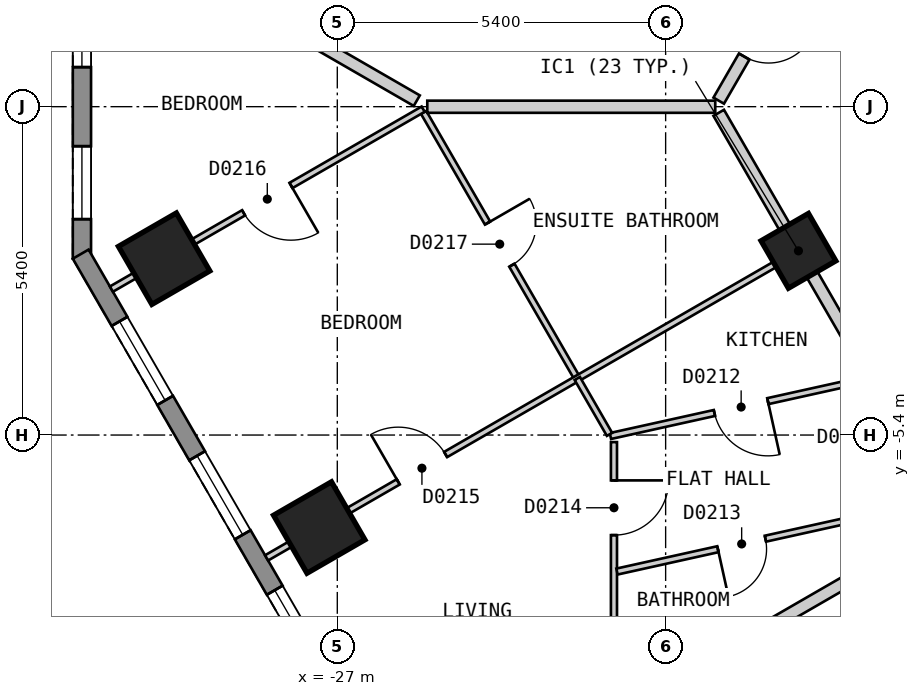
"""IFC4 building model, lengths in metres.
Left out: names, types, materials, properties, quantities, classifications, styles, units other than length and angle.
Written with IfcOpenShell. Run it as: python <this file> out.ifc"""

import sys

from ifc_helpers import new_model, si_unit, direction, frame, frame_2d, origin, origin_2d, place, context, subcontext, project, spatial, polyline, rectangle, outline, extrude, element, fill, save


model = new_model("IFC4")
c1 = context("Model", 3, precision=1e-05, world=origin(), true_north=direction((0.0, 1.0)))
c2 = subcontext(c1, "Body", "Model", "MODEL_VIEW")
j1 = project(units=[si_unit("LENGTHUNIT", "METRE"), si_unit("PLANEANGLEUNIT", "RADIAN")], contexts=[c1])
p1 = place(None, origin())
s1 = spatial("IfcSite", under=j1, at=p1, CompositionType="ELEMENT")
p2 = place(p1, origin())
s2 = spatial("IfcBuilding", under=s1, at=p2, CompositionType="ELEMENT")
p3 = place(p2, frame((0.0, 0.0, 47.4)))
s3 = spatial("IfcBuildingStorey", under=s2, at=p3, CompositionType="ELEMENT", Elevation=47.4)
for number, where, z_axis, x_axis in (
    (1, (-29.848, -2.5, 0.0), (0.0, 0.0, 1.0), (0.5, -0.866, 0.0)),
    (2, (-27.297, -6.921, 0.0), (0.0, 0.0, 1.0), (0.5, -0.866, 0.0)),
):
    element("IfcColumn", number, at=place(p3, frame(where, z_axis=z_axis, x_axis=x_axis)), inside=s3, PredefinedType="COLUMN", context=c2, shape_type="SweptSolid", body=[
        extrude(rectangle(XDim=1.1, YDim=1.1, at=origin_2d()), origin(), (0.0, 0.0, 1.0), 3.0),
    ])
p4 = place(p3, frame((-19.416, -2.371, 0.0), z_axis=(0.0, 0.0, 1.0), x_axis=(0.499984884929, -0.866034130299, 0.0)))
e3 = element("IfcColumn", 3, at=p4, inside=s3, PredefinedType="COLUMN", context=c2, shape_type="SweptSolid", body=[
    extrude(rectangle(XDim=0.9, YDim=0.9, at=origin_2d()), origin(), (0.0, 0.0, 1.0), 3.0),
])
p5 = place(p3, frame((-31.2, 2.5, 0.0), z_axis=(0.0, 0.0, 1.0), x_axis=(0.0, -1.0, 0.0)))
e4 = element("IfcWall", 4, at=p5, inside=s3, PredefinedType="SOLIDWALL", context=c2, shape_type="SweptSolid", body=[
    extrude(outline(polyline([(0.0, -0.15), (5.0, -0.15), (4.92, 0.15), (0.08, 0.15), (0.0, -0.15)])), origin(), (0.0, 0.0, 1.0), 2.7),
])
p6 = place(p5, frame((0.65, 0.0, 0.15)))
e5 = element("IfcOpeningElement", 5, at=p6, cuts=e4, PredefinedType="OPENING", context=c2, shape_type="SweptSolid", body=[
    extrude(rectangle(XDim=1.2, YDim=2.1, at=frame_2d((0.6, 1.05))), frame((0.0, 0.16, 0.0), z_axis=(0.0, -1.0, 0.0), x_axis=(1.0, 0.0, 0.0)), (0.0, 0.0, 1.0), 0.32),
])
p7 = place(p5, frame((3.15, 0.0, 0.15)))
e6 = element("IfcOpeningElement", 6, at=p7, cuts=e4, PredefinedType="OPENING", context=c2, shape_type="SweptSolid", body=[
    extrude(rectangle(XDim=1.2, YDim=2.1, at=frame_2d((0.6, 1.05))), frame((0.0, 0.16, 0.0), z_axis=(0.0, -1.0, 0.0), x_axis=(1.0, 0.0, 0.0)), (0.0, 0.0, 1.0), 0.32),
])
p8 = place(p3, frame((-31.22, -2.425, 0.0), z_axis=(0.0, 0.0, 1.0), x_axis=(0.500001938803, -0.866024284413, 0.0)))
e7 = element("IfcWall", 7, at=p8, inside=s3, PredefinedType="SOLIDWALL", context=c2, shape_type="SweptSolid", body=[
    extrude(outline(polyline([(0.0, -0.15), (27.02, -0.15), (26.94, 0.15), (0.08, 0.15), (0.0, -0.15)])), origin(), (0.0, 0.0, 1.0), 2.7),
])
p9 = place(p8, frame((1.277, 0.0, 0.15)))
e8 = element("IfcOpeningElement", 8, at=p9, cuts=e7, PredefinedType="OPENING", context=c2, shape_type="SweptSolid", body=[
    extrude(rectangle(XDim=1.5, YDim=2.1, at=frame_2d((0.75, 1.05))), frame((0.0, 0.16, 0.0), z_axis=(0.0, -1.0, 0.0), x_axis=(1.0, 0.0, 0.0)), (0.0, 0.0, 1.0), 0.32),
])
p10 = place(p8, frame((3.829, 0.0, 0.15)))
e9 = element("IfcOpeningElement", 9, at=p10, cuts=e7, PredefinedType="OPENING", context=c2, shape_type="SweptSolid", body=[
    extrude(rectangle(XDim=1.5, YDim=2.1, at=frame_2d((0.75, 1.05))), frame((0.0, 0.16, 0.0), z_axis=(0.0, -1.0, 0.0), x_axis=(1.0, 0.0, 0.0)), (0.0, 0.0, 1.0), 0.32),
])
p11 = place(p8, frame((6.382, 0.0, 0.15)))
e10 = element("IfcOpeningElement", 10, at=p11, cuts=e7, PredefinedType="OPENING", context=c2, shape_type="SweptSolid", body=[
    extrude(rectangle(XDim=1.5, YDim=2.1, at=frame_2d((0.75, 1.05))), frame((0.0, 0.16, 0.0), z_axis=(0.0, -1.0, 0.0), x_axis=(1.0, 0.0, 0.0)), (0.0, 0.0, 1.0), 0.32),
])
p12 = place(p8, frame((8.933, 0.0, 0.15)))
e11 = element("IfcOpeningElement", 11, at=p12, cuts=e7, PredefinedType="OPENING", context=c2, shape_type="SweptSolid", body=[
    extrude(rectangle(XDim=1.5, YDim=2.1, at=frame_2d((0.75, 1.05))), frame((0.0, 0.16, 0.0), z_axis=(0.0, -1.0, 0.0), x_axis=(1.0, 0.0, 0.0)), (0.0, 0.0, 1.0), 0.32),
])
p13 = place(p8, frame((11.485, 0.0, 0.15)))
e12 = element("IfcOpeningElement", 12, at=p13, cuts=e7, PredefinedType="OPENING", context=c2, shape_type="SweptSolid", body=[
    extrude(rectangle(XDim=1.5, YDim=2.1, at=frame_2d((0.75, 1.05))), frame((0.0, 0.16, 0.0), z_axis=(0.0, -1.0, 0.0), x_axis=(1.0, 0.0, 0.0)), (0.0, 0.0, 1.0), 0.32),
])
p14 = place(p8, frame((14.037, 0.0, 0.15)))
e13 = element("IfcOpeningElement", 13, at=p14, cuts=e7, PredefinedType="OPENING", context=c2, shape_type="SweptSolid", body=[
    extrude(rectangle(XDim=1.5, YDim=2.1, at=frame_2d((0.75, 1.05))), frame((0.0, 0.16, 0.0), z_axis=(0.0, -1.0, 0.0), x_axis=(1.0, 0.0, 0.0)), (0.0, 0.0, 1.0), 0.32),
])
p15 = place(p8, frame((16.589, 0.0, 0.15)))
e14 = element("IfcOpeningElement", 14, at=p15, cuts=e7, PredefinedType="OPENING", context=c2, shape_type="SweptSolid", body=[
    extrude(rectangle(XDim=1.5, YDim=2.1, at=frame_2d((0.75, 1.05))), frame((0.0, 0.16, 0.0), z_axis=(0.0, -1.0, 0.0), x_axis=(1.0, 0.0, 0.0)), (0.0, 0.0, 1.0), 0.32),
])
p16 = place(p8, frame((19.141, 0.0, 0.15)))
e15 = element("IfcOpeningElement", 15, at=p16, cuts=e7, PredefinedType="OPENING", context=c2, shape_type="SweptSolid", body=[
    extrude(rectangle(XDim=1.5, YDim=2.1, at=frame_2d((0.75, 1.05))), frame((0.0, 0.16, 0.0), z_axis=(0.0, -1.0, 0.0), x_axis=(1.0, 0.0, 0.0)), (0.0, 0.0, 1.0), 0.32),
])
p17 = place(p8, frame((21.693, 0.0, 0.15)))
e16 = element("IfcOpeningElement", 16, at=p17, cuts=e7, PredefinedType="OPENING", context=c2, shape_type="SweptSolid", body=[
    extrude(rectangle(XDim=1.5, YDim=2.1, at=frame_2d((0.75, 1.05))), frame((0.0, 0.16, 0.0), z_axis=(0.0, -1.0, 0.0), x_axis=(1.0, 0.0, 0.0)), (0.0, 0.0, 1.0), 0.32),
])
p18 = place(p8, frame((24.244, 0.0, 0.15)))
e17 = element("IfcOpeningElement", 17, at=p18, cuts=e7, PredefinedType="OPENING", context=c2, shape_type="SweptSolid", body=[
    extrude(rectangle(XDim=1.5, YDim=2.1, at=frame_2d((0.75, 1.05))), frame((0.0, 0.16, 0.0), z_axis=(0.0, -1.0, 0.0), x_axis=(1.0, 0.0, 0.0)), (0.0, 0.0, 1.0), 0.32),
])
p19 = place(p3, frame((-20.727, -0.101, 0.0), z_axis=(0.0, 0.0, 1.0), x_axis=(0.500070814966, -0.865984514884, 0.0)))
e18 = element("IfcWall", 18, at=p19, inside=s3, PredefinedType="PARTITIONING", context=c2, shape_type="SweptSolid", body=[
    extrude(rectangle(XDim=7.239, YDim=0.2, at=frame_2d((3.62, 0.0))), origin(), (0.0, 0.0, 1.0), 2.7),
])
p20 = place(p19, frame((5.681, 0.0, 0.0)))
e19 = element("IfcOpeningElement", 19, at=p20, cuts=e18, PredefinedType="OPENING", context=c2, shape_type="SweptSolid", body=[
    extrude(rectangle(XDim=1.0, YDim=2.1, at=frame_2d((0.5, 1.05))), frame((0.0, 0.11, 0.0), z_axis=(0.0, -1.0, 0.0), x_axis=(1.0, 0.0, 0.0)), (0.0, 0.0, 1.0), 0.22),
])
p21 = place(p3, frame((-20.727, 0.099, 0.0), z_axis=(0.0, 0.0, 1.0), x_axis=(0.499993204491, 0.866029327138, 0.0)))
e20 = element("IfcWall", 20, at=p21, inside=s3, PredefinedType="PARTITIONING", context=c2, shape_type="SweptSolid", body=[
    extrude(rectangle(XDim=20.554, YDim=0.2, at=frame_2d((10.277, 0.0))), origin(), (0.0, 0.0, 1.0), 2.7),
])
p22 = place(p21, frame((14.88, 0.0, 0.0)))
e21 = element("IfcOpeningElement", 21, at=p22, cuts=e20, PredefinedType="OPENING", context=c2, shape_type="SweptSolid", body=[
    extrude(rectangle(XDim=1.0, YDim=2.1, at=frame_2d((0.5, 1.05))), frame((0.0, 0.11, 0.0), z_axis=(0.0, -1.0, 0.0), x_axis=(1.0, 0.0, 0.0)), (0.0, 0.0, 1.0), 0.22),
])
p23 = place(p21, frame((4.673, 0.0, 0.0)))
e22 = element("IfcOpeningElement", 22, at=p23, cuts=e20, PredefinedType="OPENING", context=c2, shape_type="SweptSolid", body=[
    extrude(rectangle(XDim=1.0, YDim=2.1, at=frame_2d((0.5, 1.05))), frame((0.0, 0.11, 0.0), z_axis=(0.0, -1.0, 0.0), x_axis=(1.0, 0.0, 0.0)), (0.0, 0.0, 1.0), 0.22),
])
p24 = place(p21, frame((0.838, 0.0, 0.0)))
e23 = element("IfcOpeningElement", 23, at=p24, cuts=e20, PredefinedType="OPENING", context=c2, shape_type="SweptSolid", body=[
    extrude(rectangle(XDim=0.8, YDim=2.1, at=frame_2d((0.4, 1.05))), frame((0.0, 0.11, 0.0), z_axis=(0.0, -1.0, 0.0), x_axis=(1.0, 0.0, 0.0)), (0.0, 0.0, 1.0), 0.22),
])
p25 = place(p3, frame((-25.58, -0.094, 0.0), z_axis=(0.0, 0.0, 1.0), x_axis=(0.500093258202, -0.865971554441, 0.0)))
e24 = element("IfcWall", 24, at=p25, inside=s3, PredefinedType="PARTITIONING", context=c2, shape_type="SweptSolid", body=[
    extrude(rectangle(XDim=5.053, YDim=0.1, at=frame_2d((2.527, 0.0))), origin(), (0.0, 0.0, 1.0), 2.7),
])
p26 = place(p25, frame((2.102, 0.0, 0.0)))
e25 = element("IfcOpeningElement", 25, at=p26, cuts=e24, PredefinedType="OPENING", context=c2, shape_type="SweptSolid", body=[
    extrude(rectangle(XDim=0.8, YDim=2.1, at=frame_2d((0.4, 1.05))), frame((0.0, 0.06, 0.0), z_axis=(0.0, -1.0, 0.0), x_axis=(1.0, 0.0, 0.0)), (0.0, 0.0, 1.0), 0.12),
])
p27 = place(p3, frame((-22.45, -9.901, 0.0), z_axis=(0.0, 0.0, 1.0), x_axis=(0.0, 1.0, 0.0)))
e26 = element("IfcWall", 26, at=p27, inside=s3, PredefinedType="PARTITIONING", context=c2, shape_type="SweptSolid", body=[
    extrude(rectangle(XDim=4.385, YDim=0.1, at=frame_2d((2.192, 0.0))), origin(), (0.0, 0.0, 1.0), 2.7),
])
p28 = place(p27, frame((2.855, 0.0, 0.0)))
e27 = element("IfcOpeningElement", 27, at=p28, cuts=e26, PredefinedType="OPENING", context=c2, shape_type="SweptSolid", body=[
    extrude(rectangle(XDim=0.9, YDim=2.1, at=frame_2d((0.45, 1.05))), frame((0.0, 0.06, 0.0), z_axis=(0.0, -1.0, 0.0), x_axis=(1.0, 0.0, 0.0)), (0.0, 0.0, 1.0), 0.12),
])
p29 = place(p3, frame((-22.508, -5.416, 0.0), z_axis=(0.0, 0.0, 1.0), x_axis=(0.976332464286, 0.216275100696, 0.0)))
e28 = element("IfcWall", 28, at=p29, inside=s3, PredefinedType="PARTITIONING", context=c2, shape_type="SweptSolid", body=[
    extrude(rectangle(XDim=4.3, YDim=0.1, at=frame_2d((2.15, 0.0))), origin(), (0.0, 0.0, 1.0), 2.7),
])
p30 = place(p29, frame((1.752, 0.0, 0.0)))
e29 = element("IfcOpeningElement", 29, at=p30, cuts=e28, PredefinedType="OPENING", context=c2, shape_type="SweptSolid", body=[
    extrude(rectangle(XDim=0.9, YDim=2.1, at=frame_2d((0.45, 1.05))), frame((0.0, 0.06, 0.0), z_axis=(0.0, -1.0, 0.0), x_axis=(1.0, 0.0, 0.0)), (0.0, 0.0, 1.0), 0.12),
])
p31 = place(p3, frame((-22.4, -7.645, 0.0), z_axis=(0.0, 0.0, 1.0), x_axis=(0.97634896822, 0.216200583385, 0.0)))
e30 = element("IfcWall", 30, at=p31, inside=s3, PredefinedType="PARTITIONING", context=c2, shape_type="SweptSolid", body=[
    extrude(rectangle(XDim=4.25, YDim=0.1, at=frame_2d((2.125, 0.0))), origin(), (0.0, 0.0, 1.0), 2.7),
])
p32 = place(p31, frame((1.7, 0.0, 0.0)))
e31 = element("IfcOpeningElement", 31, at=p32, cuts=e30, PredefinedType="OPENING", context=c2, shape_type="SweptSolid", body=[
    extrude(rectangle(XDim=0.8, YDim=2.1, at=frame_2d((0.4, 1.05))), frame((0.0, 0.06, 0.0), z_axis=(0.0, -1.0, 0.0), x_axis=(1.0, 0.0, 0.0)), (0.0, 0.0, 1.0), 0.12),
])
p33 = place(p3, frame((-28.163, -7.42, 0.0), z_axis=(0.0, 0.0, 1.0), x_axis=(0.866065245018, 0.499930986609, 0.0)))
e32 = element("IfcWall", 32, at=p33, inside=s3, PredefinedType="PARTITIONING", context=c2, shape_type="SweptSolid", body=[
    extrude(rectangle(XDim=10.0, YDim=0.1, at=frame_2d((5.0, 0.0))), origin(), (0.0, 0.0, 1.0), 2.7),
])
p34 = place(p33, frame((2.5, 0.0, 0.0)))
e33 = element("IfcOpeningElement", 33, at=p34, cuts=e32, PredefinedType="OPENING", context=c2, shape_type="SweptSolid", body=[
    extrude(rectangle(XDim=0.9, YDim=2.1, at=frame_2d((0.45, 1.05))), frame((0.0, 0.06, 0.0), z_axis=(0.0, -1.0, 0.0), x_axis=(1.0, 0.0, 0.0)), (0.0, 0.0, 1.0), 0.12),
])
p35 = place(p3, frame((-30.715, -3.0, 0.0), z_axis=(0.0, 0.0, 1.0), x_axis=(0.866113484451, 0.499847408768, 0.0)))
e34 = element("IfcWall", 34, at=p35, inside=s3, PredefinedType="PARTITIONING", context=c2, shape_type="SweptSolid", body=[
    extrude(rectangle(XDim=5.92, YDim=0.1, at=frame_2d((2.96, 0.0))), origin(), (0.0, 0.0, 1.0), 2.7),
])
p36 = place(p35, frame((2.51, 0.0, 0.0)))
e35 = element("IfcOpeningElement", 35, at=p36, cuts=e34, PredefinedType="OPENING", context=c2, shape_type="SweptSolid", body=[
    extrude(rectangle(XDim=0.9, YDim=2.1, at=frame_2d((0.45, 1.05))), frame((0.0, 0.06, 0.0), z_axis=(0.0, -1.0, 0.0), x_axis=(1.0, 0.0, 0.0)), (0.0, 0.0, 1.0), 0.12),
])
p37 = place(p3, frame((-30.716, 2.999, 0.0), z_axis=(0.0, 0.0, 1.0), x_axis=(0.866032775405, -0.499987231761, 0.0)))
e36 = element("IfcWall", 36, at=p37, inside=s3, PredefinedType="PARTITIONING", context=c2, shape_type="SweptSolid", body=[
    extrude(rectangle(XDim=5.8, YDim=0.2, at=frame_2d((2.9, 0.0))), origin(), (0.0, 0.0, 1.0), 2.7),
])
p38 = place(p3, frame((-25.52, -0.001, 0.0), z_axis=(0.0, 0.0, 1.0), x_axis=(1.0, 0.0, 0.0)))
e37 = element("IfcWall", 37, at=p38, inside=s3, PredefinedType="PARTITIONING", context=c2, shape_type="SweptSolid", body=[
    extrude(rectangle(XDim=4.736, YDim=0.2, at=frame_2d((2.368, 0.0))), origin(), (0.0, 0.0, 1.0), 2.7),
])
p39 = place(p3, frame((-25.61, -11.841, 0.0), z_axis=(0.0, 0.0, 1.0), x_axis=(0.866019023803, 0.500011050288, 0.0)))
e38 = element("IfcWall", 38, at=p39, inside=s3, PredefinedType="PARTITIONING", context=c2, shape_type="SweptSolid", body=[
    extrude(rectangle(XDim=8.47, YDim=0.2, at=frame_2d((4.235, 0.0))), origin(), (0.0, 0.0, 1.0), 2.7),
])
p40 = place(p3, frame((-23.053, -4.47, 0.0), z_axis=(0.0, 0.0, 1.0), x_axis=(0.499629475903, -0.866239220313, 0.0)))
e39 = element("IfcWall", 39, at=p40, inside=s3, PredefinedType="PARTITIONING", context=c2, shape_type="SweptSolid", body=[
    extrude(rectangle(XDim=1.061, YDim=0.1, at=frame_2d((0.53, 0.0))), origin(), (0.0, 0.0, 1.0), 2.7),
])
p41 = place(p6, origin())
e40 = element("IfcWindow", 40, at=p41, inside=s3, PartitioningType="SINGLE_PANEL", PredefinedType="WINDOW", context=c2, shape_type="SweptSolid", body=[
    extrude(rectangle(XDim=1.2, YDim=2.1, at=frame_2d((0.6, 1.05))), frame((0.0, 0.03, 0.0), z_axis=(0.0, -1.0, 0.0), x_axis=(1.0, 0.0, 0.0)), (0.0, 0.0, 1.0), 0.06),
])
fill(e5, e40)
p42 = place(p7, origin())
e41 = element("IfcWindow", 41, at=p42, inside=s3, PartitioningType="SINGLE_PANEL", PredefinedType="WINDOW", context=c2, shape_type="SweptSolid", body=[
    extrude(rectangle(XDim=1.2, YDim=2.1, at=frame_2d((0.6, 1.05))), frame((0.0, 0.03, 0.0), z_axis=(0.0, -1.0, 0.0), x_axis=(1.0, 0.0, 0.0)), (0.0, 0.0, 1.0), 0.06),
])
fill(e6, e41)
p43 = place(p9, origin())
e42 = element("IfcWindow", 42, at=p43, inside=s3, PartitioningType="SINGLE_PANEL", PredefinedType="WINDOW", context=c2, shape_type="SweptSolid", body=[
    extrude(rectangle(XDim=1.5, YDim=2.1, at=frame_2d((0.75, 1.05))), frame((0.0, 0.03, 0.0), z_axis=(0.0, -1.0, 0.0), x_axis=(1.0, 0.0, 0.0)), (0.0, 0.0, 1.0), 0.06),
])
fill(e8, e42)
p44 = place(p10, origin())
e43 = element("IfcWindow", 43, at=p44, inside=s3, PartitioningType="SINGLE_PANEL", PredefinedType="WINDOW", context=c2, shape_type="SweptSolid", body=[
    extrude(rectangle(XDim=1.5, YDim=2.1, at=frame_2d((0.75, 1.05))), frame((0.0, 0.03, 0.0), z_axis=(0.0, -1.0, 0.0), x_axis=(1.0, 0.0, 0.0)), (0.0, 0.0, 1.0), 0.06),
])
fill(e9, e43)
p45 = place(p11, origin())
e44 = element("IfcWindow", 44, at=p45, inside=s3, PartitioningType="SINGLE_PANEL", PredefinedType="WINDOW", context=c2, shape_type="SweptSolid", body=[
    extrude(rectangle(XDim=1.5, YDim=2.1, at=frame_2d((0.75, 1.05))), frame((0.0, 0.03, 0.0), z_axis=(0.0, -1.0, 0.0), x_axis=(1.0, 0.0, 0.0)), (0.0, 0.0, 1.0), 0.06),
])
fill(e10, e44)
p46 = place(p24, origin())
e45 = element("IfcDoor", 45, at=p46, inside=s3, OperationType="SINGLE_SWING_RIGHT", PredefinedType="DOOR", context=c2, shape_type="SweptSolid", body=[
    extrude(rectangle(XDim=0.8, YDim=2.1, at=frame_2d((0.4, 1.05))), frame((0.0, 0.025, 0.0), z_axis=(0.0, -1.0, 0.0), x_axis=(1.0, 0.0, 0.0)), (0.0, 0.0, 1.0), 0.05),
])
fill(e23, e45)
p47 = place(p30, origin())
e46 = element("IfcDoor", 46, at=p47, inside=s3, OperationType="SINGLE_SWING_RIGHT", PredefinedType="DOOR", context=c2, shape_type="SweptSolid", body=[
    extrude(rectangle(XDim=0.9, YDim=2.1, at=frame_2d((0.45, 1.05))), frame((0.0, 0.025, 0.0), z_axis=(0.0, -1.0, 0.0), x_axis=(1.0, 0.0, 0.0)), (0.0, 0.0, 1.0), 0.05),
])
fill(e29, e46)
p48 = place(p32, origin())
e47 = element("IfcDoor", 47, at=p48, inside=s3, OperationType="SINGLE_SWING_LEFT", PredefinedType="DOOR", context=c2, shape_type="SweptSolid", body=[
    extrude(rectangle(XDim=0.8, YDim=2.1, at=frame_2d((0.4, 1.05))), frame((0.0, 0.025, 0.0), z_axis=(0.0, -1.0, 0.0), x_axis=(1.0, 0.0, 0.0)), (0.0, 0.0, 1.0), 0.05),
])
fill(e31, e47)
p49 = place(p28, origin())
e48 = element("IfcDoor", 48, at=p49, inside=s3, OperationType="SINGLE_SWING_RIGHT", PredefinedType="DOOR", context=c2, shape_type="SweptSolid", body=[
    extrude(rectangle(XDim=0.9, YDim=2.1, at=frame_2d((0.45, 1.05))), frame((0.0, 0.025, 0.0), z_axis=(0.0, -1.0, 0.0), x_axis=(1.0, 0.0, 0.0)), (0.0, 0.0, 1.0), 0.05),
])
fill(e27, e48)
p50 = place(p34, origin())
e49 = element("IfcDoor", 49, at=p50, inside=s3, OperationType="SINGLE_SWING_LEFT", PredefinedType="DOOR", context=c2, shape_type="SweptSolid", body=[
    extrude(rectangle(XDim=0.9, YDim=2.1, at=frame_2d((0.45, 1.05))), frame((0.0, 0.025, 0.0), z_axis=(0.0, -1.0, 0.0), x_axis=(1.0, 0.0, 0.0)), (0.0, 0.0, 1.0), 0.05),
])
fill(e33, e49)
p51 = place(p36, origin())
e50 = element("IfcDoor", 50, at=p51, inside=s3, OperationType="SINGLE_SWING_RIGHT", PredefinedType="DOOR", context=c2, shape_type="SweptSolid", body=[
    extrude(rectangle(XDim=0.9, YDim=2.1, at=frame_2d((0.45, 1.05))), frame((0.0, 0.025, 0.0), z_axis=(0.0, -1.0, 0.0), x_axis=(1.0, 0.0, 0.0)), (0.0, 0.0, 1.0), 0.05),
])
fill(e35, e50)
p52 = place(p26, origin())
e51 = element("IfcDoor", 51, at=p52, inside=s3, OperationType="SINGLE_SWING_LEFT", PredefinedType="DOOR", context=c2, shape_type="SweptSolid", body=[
    extrude(rectangle(XDim=0.8, YDim=2.1, at=frame_2d((0.4, 1.05))), frame((0.0, 0.025, 0.0), z_axis=(0.0, -1.0, 0.0), x_axis=(1.0, 0.0, 0.0)), (0.0, 0.0, 1.0), 0.05),
])
fill(e25, e51)
save(model, sys.argv[1])
